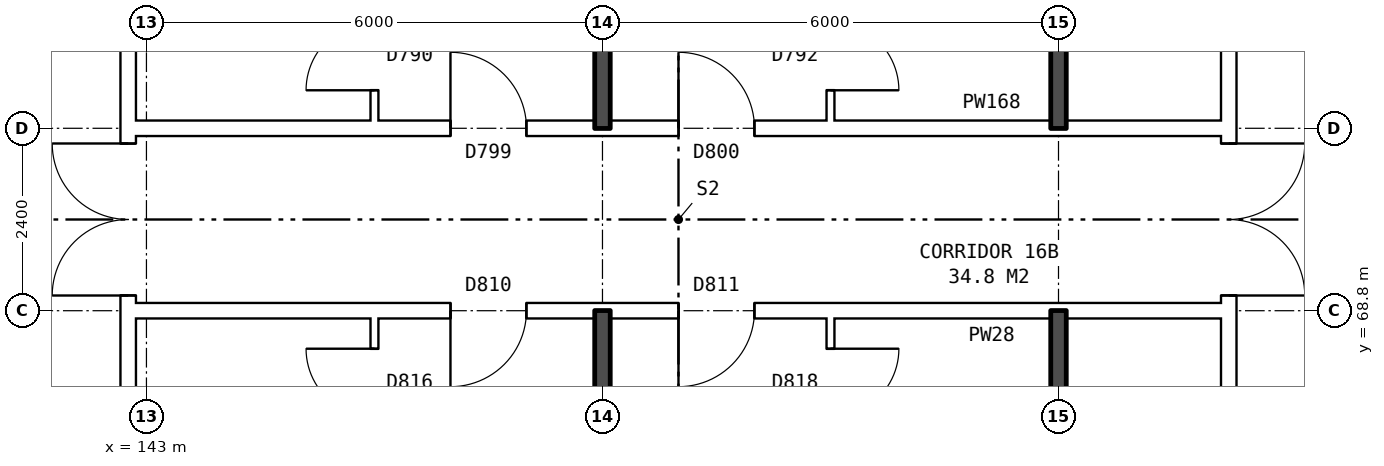
"""IFC4 building model, lengths in metres.
Left out: names, types, materials, properties, quantities, classifications, styles, units other than length and angle.
Written with IfcOpenShell. Run it as: python <this file> out.ifc"""

import sys

from ifc_helpers import new_model, si_unit, direction, frame, frame_2d, origin, place, context, subcontext, project, spatial, rectangle, extrude, element, fill, save


model = new_model("IFC4")
c1 = context("Model", 3, precision=1e-05, world=origin(), true_north=direction((0.0, 1.0)))
c2 = subcontext(c1, "Body", "Model", "MODEL_VIEW")
j1 = project(units=[si_unit("LENGTHUNIT", "METRE"), si_unit("PLANEANGLEUNIT", "RADIAN")], contexts=[c1])
p1 = place(None, origin())
s1 = spatial("IfcSite", under=j1, at=p1, CompositionType="ELEMENT")
p2 = place(p1, origin())
s2 = spatial("IfcBuilding", under=s1, at=p2, CompositionType="ELEMENT")
p3 = place(p2, frame((0.0, 0.0, 59.8)))
s3 = spatial("IfcBuildingStorey", under=s2, at=p3, CompositionType="ELEMENT", Elevation=59.8)
p4 = place(p3, frame((142.76, 63.9, 0.0), z_axis=(0.0, 0.0, 1.0), x_axis=(0.0, 1.0, 0.0)))
e1 = element("IfcWall", 1, at=p4, inside=s3, PredefinedType="PARTITIONING", context=c2, shape_type="SweptSolid", body=[
    extrude(rectangle(XDim=12.2, YDim=0.2, at=frame_2d((6.1, 0.0))), origin(), (0.0, 0.0, 1.0), 2.85),
])
p5 = place(p4, frame((5.1, 0.0, 0.0)))
e2 = element("IfcOpeningElement", 2, at=p5, cuts=e1, PredefinedType="OPENING", context=c2, shape_type="SweptSolid", body=[
    extrude(rectangle(XDim=2.0, YDim=2.1, at=frame_2d((1.0, 1.05))), frame((0.0, 0.11, 0.0), z_axis=(0.0, -1.0, 0.0), x_axis=(1.0, 0.0, 0.0)), (0.0, 0.0, 1.0), 0.22),
])
p6 = place(p3, frame((157.24, 63.9, 0.0), z_axis=(0.0, 0.0, 1.0), x_axis=(0.0, 1.0, 0.0)))
e3 = element("IfcWall", 3, at=p6, inside=s3, PredefinedType="PARTITIONING", context=c2, shape_type="SweptSolid", body=[
    extrude(rectangle(XDim=12.2, YDim=0.2, at=frame_2d((6.1, 0.0))), origin(), (0.0, 0.0, 1.0), 2.85),
])
p7 = place(p6, frame((5.1, 0.0, 0.0)))
e4 = element("IfcOpeningElement", 4, at=p7, cuts=e3, PredefinedType="OPENING", context=c2, shape_type="SweptSolid", body=[
    extrude(rectangle(XDim=2.0, YDim=2.1, at=frame_2d((1.0, 1.05))), frame((0.0, 0.11, 0.0), z_axis=(0.0, -1.0, 0.0), x_axis=(1.0, 0.0, 0.0)), (0.0, 0.0, 1.0), 0.22),
])
p8 = place(p3, frame((142.76, 68.8, 0.0), z_axis=(0.0, 0.0, 1.0), x_axis=(1.0, 0.0, 0.0)))
e5 = element("IfcWall", 5, at=p8, inside=s3, PredefinedType="PARTITIONING", context=c2, shape_type="SweptSolid", body=[
    extrude(rectangle(XDim=14.48, YDim=0.2, at=frame_2d((7.24, 0.0))), origin(), (0.0, 0.0, 1.0), 2.85),
])
p9 = place(p8, frame((4.24, 0.0, 0.0)))
e6 = element("IfcOpeningElement", 6, at=p9, cuts=e5, PredefinedType="OPENING", context=c2, shape_type="SweptSolid", body=[
    extrude(rectangle(XDim=1.0, YDim=2.1, at=frame_2d((0.5, 1.05))), frame((0.0, 0.11, 0.0), z_axis=(0.0, -1.0, 0.0), x_axis=(1.0, 0.0, 0.0)), (0.0, 0.0, 1.0), 0.22),
])
p10 = place(p8, frame((7.24, 0.0, 0.0)))
e7 = element("IfcOpeningElement", 7, at=p10, cuts=e5, PredefinedType="OPENING", context=c2, shape_type="SweptSolid", body=[
    extrude(rectangle(XDim=1.0, YDim=2.1, at=frame_2d((0.5, 1.05))), frame((0.0, 0.11, 0.0), z_axis=(0.0, -1.0, 0.0), x_axis=(1.0, 0.0, 0.0)), (0.0, 0.0, 1.0), 0.22),
])
p11 = place(p3, frame((142.76, 71.2, 0.0), z_axis=(0.0, 0.0, 1.0), x_axis=(1.0, 0.0, 0.0)))
e8 = element("IfcWall", 8, at=p11, inside=s3, PredefinedType="PARTITIONING", context=c2, shape_type="SweptSolid", body=[
    extrude(rectangle(XDim=14.48, YDim=0.2, at=frame_2d((7.24, 0.0))), origin(), (0.0, 0.0, 1.0), 2.85),
])
p12 = place(p11, frame((4.24, 0.0, 0.0)))
e9 = element("IfcOpeningElement", 9, at=p12, cuts=e8, PredefinedType="OPENING", context=c2, shape_type="SweptSolid", body=[
    extrude(rectangle(XDim=1.0, YDim=2.1, at=frame_2d((0.5, 1.05))), frame((0.0, 0.11, 0.0), z_axis=(0.0, -1.0, 0.0), x_axis=(1.0, 0.0, 0.0)), (0.0, 0.0, 1.0), 0.22),
])
p13 = place(p11, frame((7.24, 0.0, 0.0)))
e10 = element("IfcOpeningElement", 10, at=p13, cuts=e8, PredefinedType="OPENING", context=c2, shape_type="SweptSolid", body=[
    extrude(rectangle(XDim=1.0, YDim=2.1, at=frame_2d((0.5, 1.05))), frame((0.0, 0.11, 0.0), z_axis=(0.0, -1.0, 0.0), x_axis=(1.0, 0.0, 0.0)), (0.0, 0.0, 1.0), 0.22),
])
p14 = place(p3, frame((146.0, 54.36, 0.0), z_axis=(0.0, 0.0, 1.0), x_axis=(0.0, 1.0, 0.0)))
e11 = element("IfcWall", 11, at=p14, inside=s3, PredefinedType="PARTITIONING", context=c2, shape_type="SweptSolid", body=[
    extrude(rectangle(XDim=14.34, YDim=0.1, at=frame_2d((7.17, 0.0))), origin(), (0.0, 0.0, 1.0), 2.85),
])
p15 = place(p14, frame((4.2, 0.0, 0.0)))
e12 = element("IfcOpeningElement", 12, at=p15, cuts=e11, PredefinedType="OPENING", context=c2, shape_type="SweptSolid", body=[
    extrude(rectangle(XDim=0.9, YDim=2.1, at=frame_2d((0.45, 1.05))), frame((0.0, 0.06, 0.0), z_axis=(0.0, -1.0, 0.0), x_axis=(1.0, 0.0, 0.0)), (0.0, 0.0, 1.0), 0.12),
])
p16 = place(p14, frame((13.04, 0.0, 0.0)))
e13 = element("IfcOpeningElement", 13, at=p16, cuts=e11, PredefinedType="OPENING", context=c2, shape_type="SweptSolid", body=[
    extrude(rectangle(XDim=0.9, YDim=2.1, at=frame_2d((0.45, 1.05))), frame((0.0, 0.06, 0.0), z_axis=(0.0, -1.0, 0.0), x_axis=(1.0, 0.0, 0.0)), (0.0, 0.0, 1.0), 0.12),
])
p17 = place(p3, frame((146.0, 71.3, 0.0), z_axis=(0.0, 0.0, 1.0), x_axis=(0.0, 1.0, 0.0)))
e14 = element("IfcWall", 14, at=p17, inside=s3, PredefinedType="PARTITIONING", context=c2, shape_type="SweptSolid", body=[
    extrude(rectangle(XDim=14.34, YDim=0.1, at=frame_2d((7.17, 0.0))), origin(), (0.0, 0.0, 1.0), 2.85),
])
p18 = place(p17, frame((9.24, 0.0, 0.0)))
e15 = element("IfcOpeningElement", 15, at=p18, cuts=e14, PredefinedType="OPENING", context=c2, shape_type="SweptSolid", body=[
    extrude(rectangle(XDim=0.9, YDim=2.1, at=frame_2d((0.45, 1.05))), frame((0.0, 0.06, 0.0), z_axis=(0.0, -1.0, 0.0), x_axis=(1.0, 0.0, 0.0)), (0.0, 0.0, 1.0), 0.12),
])
p19 = place(p17, frame((0.4, 0.0, 0.0)))
e16 = element("IfcOpeningElement", 16, at=p19, cuts=e14, PredefinedType="OPENING", context=c2, shape_type="SweptSolid", body=[
    extrude(rectangle(XDim=0.9, YDim=2.1, at=frame_2d((0.45, 1.05))), frame((0.0, 0.06, 0.0), z_axis=(0.0, -1.0, 0.0), x_axis=(1.0, 0.0, 0.0)), (0.0, 0.0, 1.0), 0.12),
])
for number, where, z_axis, x_axis in (
    (17, (149.0, 54.36, 0.0), (0.0, 0.0, 1.0), (0.0, 1.0, 0.0)),
    (18, (149.0, 71.2, 0.0), (0.0, 0.0, 1.0), (0.0, 1.0, 0.0)),
):
    element("IfcWall", number, at=place(p3, frame(where, z_axis=z_axis, x_axis=x_axis)), inside=s3, PredefinedType="SOLIDWALL", context=c2, shape_type="SweptSolid", body=[
        extrude(rectangle(XDim=14.44, YDim=0.2, at=frame_2d((7.22, 0.0))), origin(), (0.0, 0.0, 1.0), 2.85),
    ])
p20 = place(p3, frame((152.0, 54.36, 0.0), z_axis=(0.0, 0.0, 1.0), x_axis=(0.0, 1.0, 0.0)))
e19 = element("IfcWall", 19, at=p20, inside=s3, PredefinedType="PARTITIONING", context=c2, shape_type="SweptSolid", body=[
    extrude(rectangle(XDim=14.34, YDim=0.1, at=frame_2d((7.17, 0.0))), origin(), (0.0, 0.0, 1.0), 2.85),
])
p21 = place(p20, frame((4.2, 0.0, 0.0)))
e20 = element("IfcOpeningElement", 20, at=p21, cuts=e19, PredefinedType="OPENING", context=c2, shape_type="SweptSolid", body=[
    extrude(rectangle(XDim=0.9, YDim=2.1, at=frame_2d((0.45, 1.05))), frame((0.0, 0.06, 0.0), z_axis=(0.0, -1.0, 0.0), x_axis=(1.0, 0.0, 0.0)), (0.0, 0.0, 1.0), 0.12),
])
p22 = place(p20, frame((13.04, 0.0, 0.0)))
e21 = element("IfcOpeningElement", 21, at=p22, cuts=e19, PredefinedType="OPENING", context=c2, shape_type="SweptSolid", body=[
    extrude(rectangle(XDim=0.9, YDim=2.1, at=frame_2d((0.45, 1.05))), frame((0.0, 0.06, 0.0), z_axis=(0.0, -1.0, 0.0), x_axis=(1.0, 0.0, 0.0)), (0.0, 0.0, 1.0), 0.12),
])
p23 = place(p3, frame((152.0, 71.3, 0.0), z_axis=(0.0, 0.0, 1.0), x_axis=(0.0, 1.0, 0.0)))
e22 = element("IfcWall", 22, at=p23, inside=s3, PredefinedType="PARTITIONING", context=c2, shape_type="SweptSolid", body=[
    extrude(rectangle(XDim=14.34, YDim=0.1, at=frame_2d((7.17, 0.0))), origin(), (0.0, 0.0, 1.0), 2.85),
])
p24 = place(p23, frame((6.74, 0.0, 0.0)))
e23 = element("IfcOpeningElement", 23, at=p24, cuts=e22, PredefinedType="OPENING", context=c2, shape_type="SweptSolid", body=[
    extrude(rectangle(XDim=0.9, YDim=2.1, at=frame_2d((0.45, 1.05))), frame((0.0, 0.06, 0.0), z_axis=(0.0, -1.0, 0.0), x_axis=(1.0, 0.0, 0.0)), (0.0, 0.0, 1.0), 0.12),
])
p25 = place(p23, frame((0.4, 0.0, 0.0)))
e24 = element("IfcOpeningElement", 24, at=p25, cuts=e22, PredefinedType="OPENING", context=c2, shape_type="SweptSolid", body=[
    extrude(rectangle(XDim=0.9, YDim=2.1, at=frame_2d((0.45, 1.05))), frame((0.0, 0.06, 0.0), z_axis=(0.0, -1.0, 0.0), x_axis=(1.0, 0.0, 0.0)), (0.0, 0.0, 1.0), 0.12),
])
for number, where, z_axis, x_axis in (
    (25, (155.0, 63.8, 0.0), (0.0, 0.0, 1.0), (0.0, 1.0, 0.0)),
    (26, (155.0, 71.2, 0.0), (0.0, 0.0, 1.0), (0.0, 1.0, 0.0)),
):
    element("IfcWall", number, at=place(p3, frame(where, z_axis=z_axis, x_axis=x_axis)), inside=s3, PredefinedType="SOLIDWALL", context=c2, shape_type="SweptSolid", body=[
        extrude(rectangle(XDim=5.0, YDim=0.2, at=frame_2d((2.5, 0.0))), origin(), (0.0, 0.0, 1.0), 2.85),
    ])
p26 = place(p5, origin())
e27 = element("IfcDoor", 27, at=p26, inside=s3, OperationType="DOUBLE_DOOR_SINGLE_SWING", PredefinedType="DOOR", context=c2, shape_type="SweptSolid", body=[
    extrude(rectangle(XDim=2.0, YDim=2.1, at=frame_2d((1.0, 1.05))), frame((0.0, 0.025, 0.0), z_axis=(0.0, -1.0, 0.0), x_axis=(1.0, 0.0, 0.0)), (0.0, 0.0, 1.0), 0.05),
])
fill(e2, e27)
p27 = place(p7, frame((2.0, 0.0, 0.0), z_axis=(0.0, 0.0, 1.0), x_axis=(-1.0, 0.0, 0.0)))
e28 = element("IfcDoor", 28, at=p27, inside=s3, OperationType="DOUBLE_DOOR_SINGLE_SWING", PredefinedType="DOOR", context=c2, shape_type="SweptSolid", body=[
    extrude(rectangle(XDim=2.0, YDim=2.1, at=frame_2d((1.0, 1.05))), frame((0.0, 0.025, 0.0), z_axis=(0.0, -1.0, 0.0), x_axis=(1.0, 0.0, 0.0)), (0.0, 0.0, 1.0), 0.05),
])
fill(e4, e28)
p28 = place(p9, frame((1.0, 0.0, 0.0), z_axis=(0.0, 0.0, 1.0), x_axis=(-1.0, 0.0, 0.0)))
e29 = element("IfcDoor", 29, at=p28, inside=s3, OperationType="SINGLE_SWING_RIGHT", PredefinedType="DOOR", context=c2, shape_type="SweptSolid", body=[
    extrude(rectangle(XDim=1.0, YDim=2.1, at=frame_2d((0.5, 1.05))), frame((0.0, 0.025, 0.0), z_axis=(0.0, -1.0, 0.0), x_axis=(1.0, 0.0, 0.0)), (0.0, 0.0, 1.0), 0.05),
])
fill(e6, e29)
p29 = place(p16, origin())
e30 = element("IfcDoor", 30, at=p29, inside=s3, OperationType="SINGLE_SWING_RIGHT", PredefinedType="DOOR", context=c2, shape_type="SweptSolid", body=[
    extrude(rectangle(XDim=0.9, YDim=2.1, at=frame_2d((0.45, 1.05))), frame((0.0, 0.025, 0.0), z_axis=(0.0, -1.0, 0.0), x_axis=(1.0, 0.0, 0.0)), (0.0, 0.0, 1.0), 0.05),
])
fill(e13, e30)
p30 = place(p10, frame((1.0, 0.0, 0.0), z_axis=(0.0, 0.0, 1.0), x_axis=(-1.0, 0.0, 0.0)))
e31 = element("IfcDoor", 31, at=p30, inside=s3, OperationType="SINGLE_SWING_RIGHT", PredefinedType="DOOR", context=c2, shape_type="SweptSolid", body=[
    extrude(rectangle(XDim=1.0, YDim=2.1, at=frame_2d((0.5, 1.05))), frame((0.0, 0.025, 0.0), z_axis=(0.0, -1.0, 0.0), x_axis=(1.0, 0.0, 0.0)), (0.0, 0.0, 1.0), 0.05),
])
fill(e7, e31)
p31 = place(p22, frame((0.9, 0.0, 0.0), z_axis=(0.0, 0.0, 1.0), x_axis=(-1.0, 0.0, 0.0)))
e32 = element("IfcDoor", 32, at=p31, inside=s3, OperationType="SINGLE_SWING_LEFT", PredefinedType="DOOR", context=c2, shape_type="SweptSolid", body=[
    extrude(rectangle(XDim=0.9, YDim=2.1, at=frame_2d((0.45, 1.05))), frame((0.0, 0.025, 0.0), z_axis=(0.0, -1.0, 0.0), x_axis=(1.0, 0.0, 0.0)), (0.0, 0.0, 1.0), 0.05),
])
fill(e21, e32)
p32 = place(p12, origin())
e33 = element("IfcDoor", 33, at=p32, inside=s3, OperationType="SINGLE_SWING_LEFT", PredefinedType="DOOR", context=c2, shape_type="SweptSolid", body=[
    extrude(rectangle(XDim=1.0, YDim=2.1, at=frame_2d((0.5, 1.05))), frame((0.0, 0.025, 0.0), z_axis=(0.0, -1.0, 0.0), x_axis=(1.0, 0.0, 0.0)), (0.0, 0.0, 1.0), 0.05),
])
fill(e9, e33)
p33 = place(p19, origin())
e34 = element("IfcDoor", 34, at=p33, inside=s3, OperationType="SINGLE_SWING_LEFT", PredefinedType="DOOR", context=c2, shape_type="SweptSolid", body=[
    extrude(rectangle(XDim=0.9, YDim=2.1, at=frame_2d((0.45, 1.05))), frame((0.0, 0.025, 0.0), z_axis=(0.0, -1.0, 0.0), x_axis=(1.0, 0.0, 0.0)), (0.0, 0.0, 1.0), 0.05),
])
fill(e16, e34)
p34 = place(p13, origin())
e35 = element("IfcDoor", 35, at=p34, inside=s3, OperationType="SINGLE_SWING_LEFT", PredefinedType="DOOR", context=c2, shape_type="SweptSolid", body=[
    extrude(rectangle(XDim=1.0, YDim=2.1, at=frame_2d((0.5, 1.05))), frame((0.0, 0.025, 0.0), z_axis=(0.0, -1.0, 0.0), x_axis=(1.0, 0.0, 0.0)), (0.0, 0.0, 1.0), 0.05),
])
fill(e10, e35)
p35 = place(p25, frame((0.9, 0.0, 0.0), z_axis=(0.0, 0.0, 1.0), x_axis=(-1.0, 0.0, 0.0)))
e36 = element("IfcDoor", 36, at=p35, inside=s3, OperationType="SINGLE_SWING_RIGHT", PredefinedType="DOOR", context=c2, shape_type="SweptSolid", body=[
    extrude(rectangle(XDim=0.9, YDim=2.1, at=frame_2d((0.45, 1.05))), frame((0.0, 0.025, 0.0), z_axis=(0.0, -1.0, 0.0), x_axis=(1.0, 0.0, 0.0)), (0.0, 0.0, 1.0), 0.05),
])
fill(e24, e36)
save(model, sys.argv[1])
